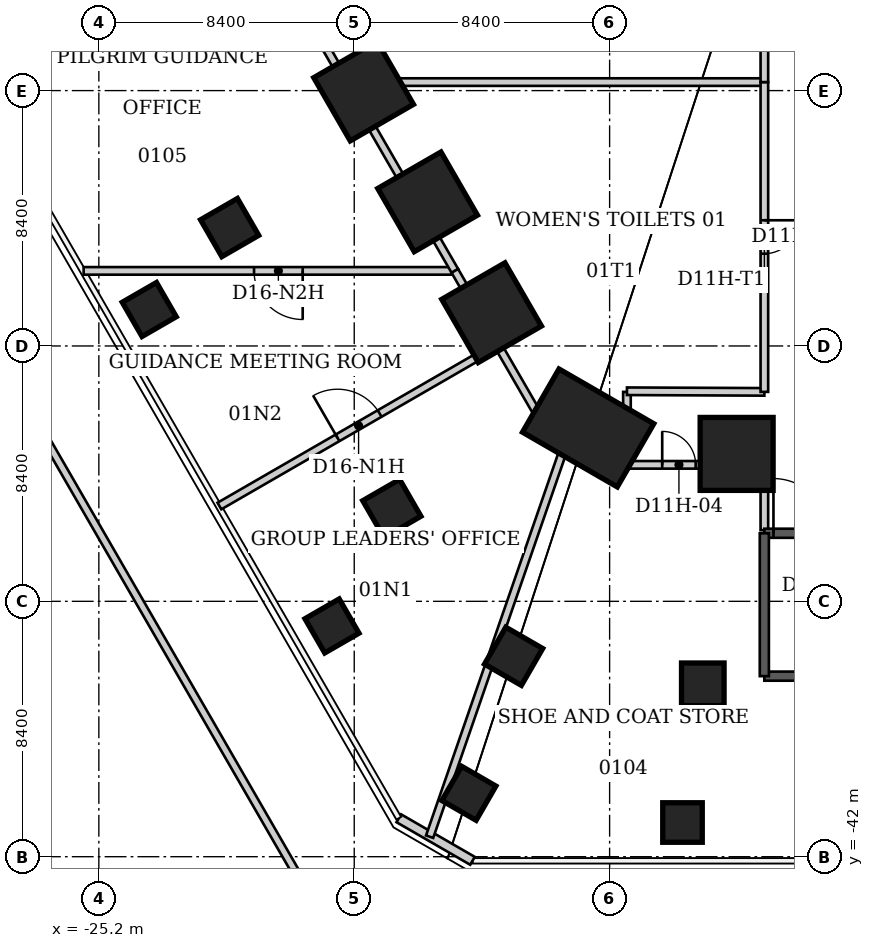
"""IFC4 building model, lengths in metres.
Left out: names, types, materials, properties, quantities, classifications, styles, units other than length and angle.
Written with IfcOpenShell. Run it as: python <this file> out.ifc"""

import sys

from ifc_helpers import new_model, si_unit, direction, frame, frame_2d, origin, origin_2d, place, context, subcontext, project, spatial, rectangle, extrude, element, fill, save


model = new_model("IFC4")
c1 = context("Model", 3, precision=1e-05, world=origin(), true_north=direction((0.0, 1.0)))
c2 = subcontext(c1, "Body", "Model", "MODEL_VIEW")
j1 = project(units=[si_unit("LENGTHUNIT", "METRE"), si_unit("PLANEANGLEUNIT", "RADIAN")], contexts=[c1])
p1 = place(None, origin())
s1 = spatial("IfcSite", under=j1, at=p1, CompositionType="ELEMENT")
p2 = place(p1, origin())
s2 = spatial("IfcBuilding", under=s1, at=p2, CompositionType="ELEMENT")
p3 = place(p2, frame((0.0, 0.0, 6.0)))
s3 = spatial("IfcBuildingStorey", under=s2, at=p3, CompositionType="ELEMENT", Elevation=6.0)
p4 = place(p3, frame((-4.222, -28.751, 0.0), z_axis=(0.0, 0.0, 1.0), x_axis=(0.0, -1.0, 0.0)))
e1 = element("IfcColumn", 1, at=p4, inside=s3, PredefinedType="COLUMN", context=c2, shape_type="SweptSolid", body=[
    extrude(rectangle(XDim=2.4, YDim=2.4, at=origin_2d()), origin(), (0.0, 0.0, 1.0), 6.0),
])
p5 = place(p3, frame((-9.106, -27.897, 0.0), z_axis=(0.0, 0.0, 1.0), x_axis=(-0.5, -0.866025403784, 0.0)))
e2 = element("IfcColumn", 2, at=p5, inside=s3, PredefinedType="COLUMN", context=c2, shape_type="SweptSolid", body=[
    extrude(rectangle(XDim=2.4, YDim=3.6, at=origin_2d()), origin(), (0.0, 0.0, 1.0), 6.0),
])
for number, where, z_axis, x_axis in (
    (3, (-12.282, -24.105, 0.0), (0.0, 0.0, 1.0), (-0.866, -0.5, 0.0)),
    (4, (-14.387, -20.459, 0.0), (0.0, 0.0, 1.0), (-0.866, -0.5, 0.0)),
    (5, (-16.491, -16.813, 0.0), (0.0, 0.0, 1.0), (-0.866, -0.5, 0.0)),
):
    element("IfcColumn", number, at=place(p3, frame(where, z_axis=z_axis, x_axis=x_axis)), inside=s3, PredefinedType="COLUMN", context=c2, shape_type="SweptSolid", body=[
        extrude(rectangle(XDim=2.4, YDim=2.4, at=origin_2d()), origin(), (0.0, 0.0, 1.0), 6.0),
    ])
for number, where, z_axis, x_axis in (
    (6, (-5.335, -36.329, 0.0), (0.0, 0.0, 1.0), (0.0, -1.0, 0.0)),
    (7, (-11.558, -35.408, 0.0), (0.0, 0.0, 1.0), (-0.5, -0.866, 0.0)),
    (8, (-15.563, -30.546, 0.0), (0.0, 0.0, 1.0), (-0.866, -0.5, 0.0)),
    (9, (-20.898, -21.305, 0.0), (0.0, 0.0, 1.0), (-0.866, -0.5, 0.0)),
):
    element("IfcColumn", number, at=place(p3, frame(where, z_axis=z_axis, x_axis=x_axis)), inside=s3, PredefinedType="COLUMN", context=c2, shape_type="SweptSolid", body=[
        extrude(rectangle(XDim=1.4, YDim=1.4, at=origin_2d()), origin(), (0.0, 0.0, 1.0), 6.0),
    ])
for number, where, z_axis, x_axis in (
    (10, (-6.003, -40.875, 0.0), (0.0, 0.0, 1.0), (0.0, -1.0, 0.0)),
    (11, (-13.029, -39.915, 0.0), (0.0, 0.0, 1.0), (-0.5, -0.866, 0.0)),
    (12, (-17.532, -34.41, 0.0), (0.0, 0.0, 1.0), (-0.866, -0.5, 0.0)),
    (13, (-23.542, -24.001, 0.0), (0.0, 0.0, 1.0), (-0.866, -0.5, 0.0)),
):
    element("IfcColumn", number, at=place(p3, frame(where, z_axis=z_axis, x_axis=x_axis)), inside=s3, PredefinedType="COLUMN", context=c2, shape_type="SweptSolid", body=[
        extrude(rectangle(XDim=1.3, YDim=1.3, at=origin_2d()), origin(), (0.0, 0.0, 1.0), 6.0),
    ])
p6 = place(p3, frame((-12.91, -42.135, 0.0), z_axis=(0.0, 0.0, 1.0), x_axis=(-0.866056369097, 0.49994636267, 0.0)))
e14 = element("IfcWall", 14, at=p6, inside=s3, PredefinedType="SOLIDWALL", context=c2, shape_type="SweptSolid", body=[
    extrude(rectangle(XDim=2.8, YDim=0.3, at=frame_2d((1.4, 0.0))), origin(), (0.0, 0.0, 1.0), 5.84),
])
p7 = place(p3, frame((-47.782, 7.822, 0.0), z_axis=(0.0, 0.0, 1.0), x_axis=(0.499999154746, -0.866025891791, 0.0)))
e15 = element("IfcWall", 15, at=p7, inside=s3, PredefinedType="PARAPET", context=c2, shape_type="SweptSolid", body=[
    extrude(rectangle(XDim=61.33, YDim=0.25, at=frame_2d((30.665, 0.0))), origin(), (0.0, 0.0, 1.0), 1.1),
])
p8 = place(p3, frame((-22.682, -6.821, 0.0), z_axis=(0.0, 0.0, 1.0), x_axis=(0.500140682179, -0.865944165654, 0.0)))
e16 = element("IfcWall", 16, at=p8, inside=s3, PredefinedType="PARTITIONING", context=c2, shape_type="SweptSolid", body=[
    extrude(rectangle(XDim=11.2, YDim=0.25, at=frame_2d((5.6, 0.0))), origin(), (0.0, 0.0, 1.0), 4.04),
])
p9 = place(p3, frame((-21.234, -30.465, 0.0), z_axis=(0.0, 0.0, 1.0), x_axis=(0.866022886878, 0.500004359385, 0.0)))
e17 = element("IfcWall", 17, at=p9, inside=s3, PredefinedType="PARTITIONING", context=c2, shape_type="SweptSolid", body=[
    extrude(rectangle(XDim=10.57, YDim=0.25, at=frame_2d((5.285, 0.0))), origin(), (0.0, 0.0, 1.0), 5.75),
])
p10 = place(p9, frame((4.485, 0.0, 0.0)))
e18 = element("IfcOpeningElement", 18, at=p10, cuts=e17, PredefinedType="OPENING", context=c2, shape_type="SweptSolid", body=[
    extrude(rectangle(XDim=1.6, YDim=2.4, at=frame_2d((0.8, 1.2))), frame((0.0, 0.125, 0.0), z_axis=(0.0, -1.0, 0.0), x_axis=(1.0, 0.0, 0.0)), (0.0, 0.0, 1.0), 0.25),
])
p11 = place(p3, frame((-14.32, -41.342, 0.0), z_axis=(0.0, 0.0, 1.0), x_axis=(0.326937002365, 0.94504613458, 0.0)))
e19 = element("IfcWall", 19, at=p11, inside=s3, PredefinedType="PARTITIONING", context=c2, shape_type="SweptSolid", body=[
    extrude(rectangle(XDim=13.673, YDim=0.25, at=frame_2d((6.836, 0.0))), origin(), (0.0, 0.0, 1.0), 5.75),
])
p12 = place(p3, frame((-13.49, -22.73, 0.0), z_axis=(0.0, 0.0, 1.0), x_axis=(-1.0, 0.0, 0.0)))
e20 = element("IfcWall", 20, at=p12, inside=s3, PredefinedType="PARTITIONING", context=c2, shape_type="SweptSolid", body=[
    extrude(rectangle(XDim=12.21, YDim=0.25, at=frame_2d((6.105, 0.0))), origin(), (0.0, 0.0, 1.0), 5.75),
])
p13 = place(p12, frame((5.005, 0.0, 0.0)))
e21 = element("IfcOpeningElement", 21, at=p13, cuts=e20, PredefinedType="OPENING", context=c2, shape_type="SweptSolid", body=[
    extrude(rectangle(XDim=1.6, YDim=2.4, at=frame_2d((0.8, 1.2))), frame((0.0, 0.125, 0.0), z_axis=(0.0, -1.0, 0.0), x_axis=(1.0, 0.0, 0.0)), (0.0, 0.0, 1.0), 0.25),
])
p14 = place(p3, frame((-13.49, -22.73, 0.0), z_axis=(0.0, 0.0, 1.0), x_axis=(-0.500498166141, 0.865737596325, 0.0)))
e22 = element("IfcWall", 22, at=p14, inside=s3, PredefinedType="PARTITIONING", context=c2, shape_type="SweptSolid", body=[
    extrude(rectangle(XDim=7.173, YDim=0.25, at=frame_2d((3.586, 0.0))), origin(), (0.0, 0.0, 1.0), 4.04),
])
p15 = place(p3, frame((-12.08, -25.18, 0.0), z_axis=(0.0, 0.0, 1.0), x_axis=(-0.49878752461, 0.86672429601, 0.0)))
e23 = element("IfcWall", 23, at=p15, inside=s3, PredefinedType="PARTITIONING", context=c2, shape_type="SweptSolid", body=[
    extrude(rectangle(XDim=2.827, YDim=0.25, at=frame_2d((1.413, 0.0))), origin(), (0.0, 0.0, 1.0), 4.04),
])
p16 = place(p3, frame((-10.38, -28.11, 0.0), z_axis=(0.0, 0.0, 1.0), x_axis=(-0.500502105275, 0.86573531903, 0.0)))
e24 = element("IfcWall", 24, at=p16, inside=s3, PredefinedType="PARTITIONING", context=c2, shape_type="SweptSolid", body=[
    extrude(rectangle(XDim=3.388, YDim=0.25, at=frame_2d((1.694, 0.0))), origin(), (0.0, 0.0, 1.0), 5.84),
])
p17 = place(p3, frame((-10.38, -28.11, 0.0), z_axis=(0.0, 0.0, 1.0), x_axis=(0.865714845822, -0.5005375168, 0.0)))
e25 = element("IfcWall", 25, at=p17, inside=s3, PredefinedType="PARTITIONING", context=c2, shape_type="SweptSolid", body=[
    extrude(rectangle(XDim=0.579, YDim=0.25, at=frame_2d((0.29, 0.0))), origin(), (0.0, 0.0, 1.0), 5.84),
])
p18 = place(p3, frame((-8.65, -29.11, 0.0), z_axis=(0.0, 0.0, 1.0), x_axis=(-0.866883441829, 0.498510880807, 0.0)))
e26 = element("IfcWall", 26, at=p18, inside=s3, PredefinedType="PARTITIONING", context=c2, shape_type="SweptSolid", body=[
    extrude(rectangle(XDim=1.385, YDim=0.25, at=frame_2d((0.692, 0.0))), origin(), (0.0, 0.0, 1.0), 5.84),
])
p19 = place(p3, frame((-8.65, -29.11, 0.0), z_axis=(0.0, 0.0, 1.0), x_axis=(1.0, 0.0, 0.0)))
e27 = element("IfcWall", 27, at=p19, inside=s3, PredefinedType="PARTITIONING", context=c2, shape_type="SweptSolid", body=[
    extrude(rectangle(XDim=0.82, YDim=0.25, at=frame_2d((0.41, 0.0))), origin(), (0.0, 0.0, 1.0), 5.84),
])
p20 = place(p3, frame((-7.83, -29.11, 0.0), z_axis=(0.0, 0.0, 1.0), x_axis=(0.0, 1.0, 0.0)))
e28 = element("IfcWall", 28, at=p20, inside=s3, PredefinedType="PARTITIONING", context=c2, shape_type="SweptSolid", body=[
    extrude(rectangle(XDim=2.4, YDim=0.25, at=frame_2d((1.2, 0.0))), origin(), (0.0, 0.0, 1.0), 5.84),
])
p21 = place(p3, frame((-7.83, -29.11, 0.0), z_axis=(0.0, 0.0, 1.0), x_axis=(1.0, 0.0, 0.0)))
e29 = element("IfcWall", 29, at=p21, inside=s3, PredefinedType="PARTITIONING", context=c2, shape_type="SweptSolid", body=[
    extrude(rectangle(XDim=4.52, YDim=0.25, at=frame_2d((2.26, 0.0))), origin(), (0.0, 0.0, 1.0), 4.04),
])
p22 = place(p21, frame((1.16, 0.0, 0.0)))
e30 = element("IfcOpeningElement", 30, at=p22, cuts=e29, PredefinedType="OPENING", context=c2, shape_type="SweptSolid", body=[
    extrude(rectangle(XDim=1.1, YDim=2.2, at=frame_2d((0.55, 1.1))), frame((0.0, 0.125, 0.0), z_axis=(0.0, -1.0, 0.0), x_axis=(1.0, 0.0, 0.0)), (0.0, 0.0, 1.0), 0.25),
])
p23 = place(p3, frame((-7.83, -26.69, 0.0), z_axis=(0.0, 0.0, 1.0), x_axis=(0.999990191766, -0.004429037254, 0.0)))
e31 = element("IfcWall", 31, at=p23, inside=s3, PredefinedType="PARTITIONING", context=c2, shape_type="SweptSolid", body=[
    extrude(rectangle(XDim=4.52, YDim=0.25, at=frame_2d((2.26, 0.0))), origin(), (0.0, 0.0, 1.0), 5.84),
])
p24 = place(p3, frame((-3.33, -16.52, 0.0), z_axis=(0.0, 0.0, 1.0), x_axis=(-1.0, 0.0, 0.0)))
e32 = element("IfcWall", 32, at=p24, inside=s3, PredefinedType="PARTITIONING", context=c2, shape_type="SweptSolid", body=[
    extrude(rectangle(XDim=13.75, YDim=0.25, at=frame_2d((6.875, 0.0))), origin(), (0.0, 0.0, 1.0), 5.84),
])
p25 = place(p3, frame((-3.31, -29.11, 0.0), z_axis=(0.0, 0.0, 1.0), x_axis=(0.0, -1.0, 0.0)))
e33 = element("IfcWall", 33, at=p25, inside=s3, PredefinedType="PARTITIONING", context=c2, shape_type="SweptSolid", body=[
    extrude(rectangle(XDim=2.15, YDim=0.25, at=frame_2d((1.075, 0.0))), origin(), (0.0, 0.0, 1.0), 5.84),
])
p26 = place(p3, frame((-3.31, -16.52, 0.0), z_axis=(0.0, 0.0, 1.0), x_axis=(0.0, -1.0, 0.0)))
e34 = element("IfcWall", 34, at=p26, inside=s3, PredefinedType="PARTITIONING", context=c2, shape_type="SweptSolid", body=[
    extrude(rectangle(XDim=10.19, YDim=0.25, at=frame_2d((5.095, 0.0))), origin(), (0.0, 0.0, 1.0), 5.84),
])
p27 = place(p26, frame((4.545, 0.0, 0.0)))
e35 = element("IfcOpeningElement", 35, at=p27, cuts=e34, PredefinedType="OPENING", context=c2, shape_type="SweptSolid", body=[
    extrude(rectangle(XDim=1.1, YDim=2.2, at=frame_2d((0.55, 1.1))), frame((0.0, 0.125, 0.0), z_axis=(0.0, -1.0, 0.0), x_axis=(1.0, 0.0, 0.0)), (0.0, 0.0, 1.0), 0.25),
])
p28 = place(p3, frame((-3.31, -13.12, 0.0), z_axis=(0.0, 0.0, 1.0), x_axis=(0.0, -1.0, 0.0)))
e36 = element("IfcWall", 36, at=p28, inside=s3, PredefinedType="PARTITIONING", context=c2, shape_type="SweptSolid", body=[
    extrude(rectangle(XDim=3.4, YDim=0.25, at=frame_2d((1.7, 0.0))), origin(), (0.0, 0.0, 1.0), 5.84),
])
p29 = place(p3, frame((-3.311, -31.361, 0.0), z_axis=(0.0, 0.0, 1.0), x_axis=(1.0, 0.0, 0.0)))
e37 = element("IfcWall", 37, at=p29, inside=s3, PredefinedType="SHEAR", context=c2, shape_type="SweptSolid", body=[
    extrude(rectangle(XDim=9.3, YDim=0.3, at=frame_2d((4.65, 0.0))), origin(), (0.0, 0.0, 1.0), 6.0),
])
p30 = place(p29, frame((0.3, 0.0, 0.0)))
e38 = element("IfcOpeningElement", 38, at=p30, cuts=e37, PredefinedType="OPENING", context=c2, shape_type="SweptSolid", body=[
    extrude(rectangle(XDim=1.8, YDim=2.4, at=frame_2d((0.9, 1.2))), frame((0.0, 0.15, 0.0), z_axis=(0.0, -1.0, 0.0), x_axis=(1.0, 0.0, 0.0)), (0.0, 0.0, 1.0), 0.3),
])
p31 = place(p3, frame((5.989, -36.061, 0.0), z_axis=(0.0, 0.0, 1.0), x_axis=(-1.0, 0.0, 0.0)))
e39 = element("IfcWall", 39, at=p31, inside=s3, PredefinedType="SHEAR", context=c2, shape_type="SweptSolid", body=[
    extrude(rectangle(XDim=9.3, YDim=0.3, at=frame_2d((4.65, 0.0))), origin(), (0.0, 0.0, 1.0), 6.0),
])
p32 = place(p3, frame((-3.311, -36.061, 0.0), z_axis=(0.0, 0.0, 1.0), x_axis=(0.0, 1.0, 0.0)))
e40 = element("IfcWall", 40, at=p32, inside=s3, PredefinedType="SHEAR", context=c2, shape_type="SweptSolid", body=[
    extrude(rectangle(XDim=4.7, YDim=0.3, at=frame_2d((2.35, 0.0))), origin(), (0.0, 0.0, 1.0), 6.0),
])
p33 = place(p22, origin())
e41 = element("IfcDoor", 41, at=p33, inside=s3, OperationType="SINGLE_SWING_LEFT", PredefinedType="DOOR", context=c2, shape_type="SweptSolid", body=[
    extrude(rectangle(XDim=1.1, YDim=2.2, at=frame_2d((0.55, 1.1))), frame((0.0, 0.025, 0.0), z_axis=(0.0, -1.0, 0.0), x_axis=(1.0, 0.0, 0.0)), (0.0, 0.0, 1.0), 0.05),
])
fill(e30, e41)
p34 = place(p27, origin())
e42 = element("IfcDoor", 42, at=p34, inside=s3, OperationType="SINGLE_SWING_LEFT", PredefinedType="DOOR", context=c2, shape_type="SweptSolid", body=[
    extrude(rectangle(XDim=1.1, YDim=2.2, at=frame_2d((0.55, 1.1))), frame((0.0, 0.025, 0.0), z_axis=(0.0, -1.0, 0.0), x_axis=(1.0, 0.0, 0.0)), (0.0, 0.0, 1.0), 0.05),
])
fill(e35, e42)
p35 = place(p10, origin())
e43 = element("IfcDoor", 43, at=p35, inside=s3, OperationType="DOUBLE_DOOR_SINGLE_SWING", PredefinedType="DOOR", context=c2, shape_type="SweptSolid", body=[
    extrude(rectangle(XDim=1.6, YDim=2.4, at=frame_2d((0.8, 1.2))), frame((0.0, 0.025, 0.0), z_axis=(0.0, -1.0, 0.0), x_axis=(1.0, 0.0, 0.0)), (0.0, 0.0, 1.0), 0.05),
])
fill(e18, e43)
p36 = place(p13, origin())
e44 = element("IfcDoor", 44, at=p36, inside=s3, OperationType="DOUBLE_DOOR_SINGLE_SWING", PredefinedType="DOOR", context=c2, shape_type="SweptSolid", body=[
    extrude(rectangle(XDim=1.6, YDim=2.4, at=frame_2d((0.8, 1.2))), frame((0.0, 0.025, 0.0), z_axis=(0.0, -1.0, 0.0), x_axis=(1.0, 0.0, 0.0)), (0.0, 0.0, 1.0), 0.05),
])
fill(e21, e44)
p37 = place(p30, origin())
e45 = element("IfcDoor", 45, at=p37, inside=s3, OperationType="DOUBLE_DOOR_SINGLE_SWING", PredefinedType="DOOR", context=c2, shape_type="SweptSolid", body=[
    extrude(rectangle(XDim=1.8, YDim=2.4, at=frame_2d((0.9, 1.2))), frame((0.0, 0.025, 0.0), z_axis=(0.0, -1.0, 0.0), x_axis=(1.0, 0.0, 0.0)), (0.0, 0.0, 1.0), 0.05),
])
fill(e38, e45)
save(model, sys.argv[1])
